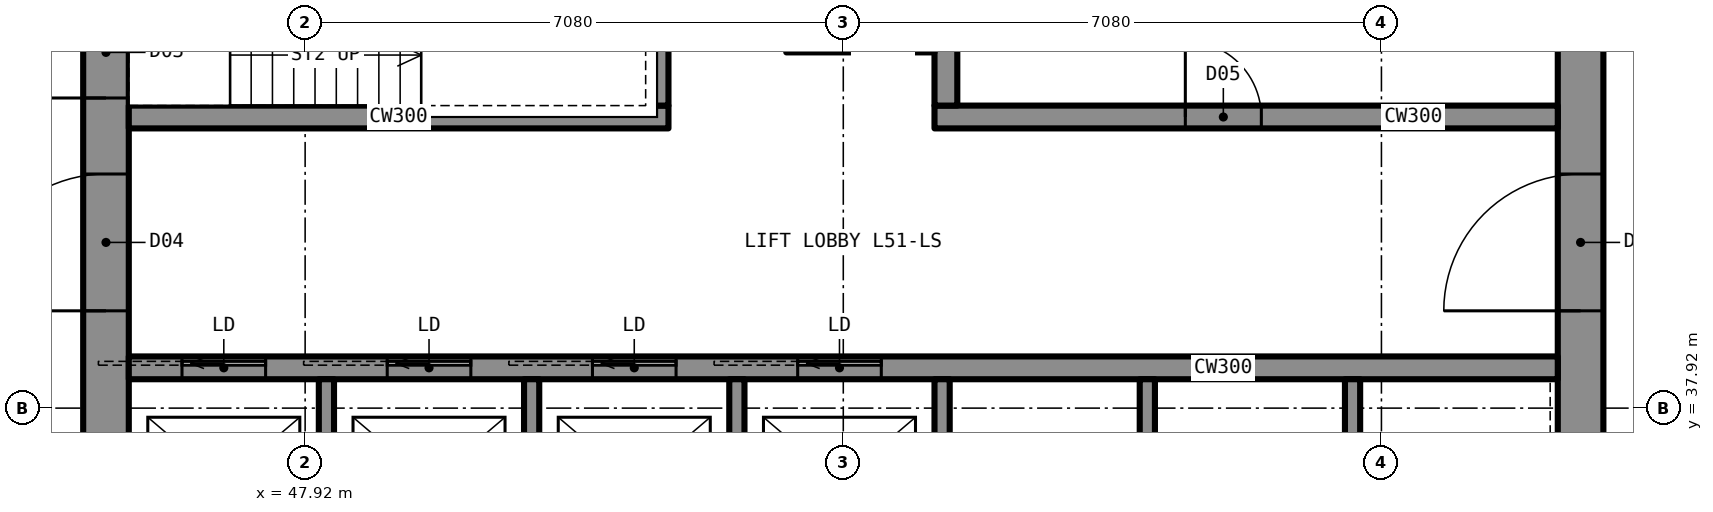
"""IFC4 building model, lengths in metres.
Left out: names, types, materials, properties, quantities, classifications, styles, units other than length and angle.
Written with IfcOpenShell. Run it as: python <this file> out.ifc"""

import sys

from ifc_helpers import new_model, si_unit, direction, frame, frame_2d, origin, place, context, subcontext, project, spatial, rectangle, extrude, element, fill, save


model = new_model("IFC4")
c1 = context("Model", 3, precision=1e-05, world=origin(), true_north=direction((0.0, 1.0)))
c2 = subcontext(c1, "Body", "Model", "MODEL_VIEW")
j1 = project(units=[si_unit("LENGTHUNIT", "METRE"), si_unit("PLANEANGLEUNIT", "RADIAN")], contexts=[c1])
p1 = place(None, origin())
s1 = spatial("IfcSite", under=j1, at=p1, CompositionType="ELEMENT")
p2 = place(p1, origin())
s2 = spatial("IfcBuilding", under=s1, at=p2, CompositionType="ELEMENT")
p3 = place(p2, frame((0.0, 0.0, 182.8)))
s3 = spatial("IfcBuildingStorey", under=s2, at=p3, CompositionType="ELEMENT", Elevation=182.8)
p4 = place(p3, frame((64.7, 35.6, 0.0), z_axis=(0.0, 0.0, 1.0), x_axis=(0.0, 1.0, 0.0)))
e1 = element("IfcWall", 1, at=p4, inside=s3, PredefinedType="SHEAR", context=c2, shape_type="SweptSolid", body=[
    extrude(rectangle(XDim=18.8, YDim=0.6, at=frame_2d((9.4, 0.0))), origin(), (0.0, 0.0, 1.0), 3.5),
])
p5 = place(p4, frame((13.4, 0.0, 0.0)))
e2 = element("IfcOpeningElement", 2, at=p5, cuts=e1, PredefinedType="OPENING", context=c2, shape_type="SweptSolid", body=[
    extrude(rectangle(XDim=1.8, YDim=2.2, at=frame_2d((0.9, 1.1))), frame((0.0, 0.31, 0.0), z_axis=(0.0, -1.0, 0.0), x_axis=(1.0, 0.0, 0.0)), (0.0, 0.0, 1.0), 0.62),
])
p6 = place(p4, frame((3.6, 0.0, 0.0)))
e3 = element("IfcOpeningElement", 3, at=p6, cuts=e1, PredefinedType="OPENING", context=c2, shape_type="SweptSolid", body=[
    extrude(rectangle(XDim=1.8, YDim=2.2, at=frame_2d((0.9, 1.1))), frame((0.0, 0.31, 0.0), z_axis=(0.0, -1.0, 0.0), x_axis=(1.0, 0.0, 0.0)), (0.0, 0.0, 1.0), 0.62),
])
p7 = place(p3, frame((45.3, 35.6, 0.0), z_axis=(0.0, 0.0, 1.0), x_axis=(0.0, 1.0, 0.0)))
e4 = element("IfcWall", 4, at=p7, inside=s3, PredefinedType="SHEAR", context=c2, shape_type="SweptSolid", body=[
    extrude(rectangle(XDim=18.8, YDim=0.6, at=frame_2d((9.4, 0.0))), origin(), (0.0, 0.0, 1.0), 3.5),
])
p8 = place(p7, frame((13.4, 0.0, 0.0)))
e5 = element("IfcOpeningElement", 5, at=p8, cuts=e4, PredefinedType="OPENING", context=c2, shape_type="SweptSolid", body=[
    extrude(rectangle(XDim=1.8, YDim=2.2, at=frame_2d((0.9, 1.1))), frame((0.0, 0.31, 0.0), z_axis=(0.0, -1.0, 0.0), x_axis=(1.0, 0.0, 0.0)), (0.0, 0.0, 1.0), 0.62),
])
p9 = place(p7, frame((3.6, 0.0, 0.0)))
e6 = element("IfcOpeningElement", 6, at=p9, cuts=e4, PredefinedType="OPENING", context=c2, shape_type="SweptSolid", body=[
    extrude(rectangle(XDim=1.8, YDim=2.2, at=frame_2d((0.9, 1.1))), frame((0.0, 0.31, 0.0), z_axis=(0.0, -1.0, 0.0), x_axis=(1.0, 0.0, 0.0)), (0.0, 0.0, 1.0), 0.62),
])
p10 = place(p7, frame((6.4, 0.0, 0.0)))
e7 = element("IfcOpeningElement", 7, at=p10, cuts=e4, PredefinedType="OPENING", context=c2, shape_type="SweptSolid", body=[
    extrude(rectangle(XDim=1.2, YDim=2.2, at=frame_2d((0.6, 1.1))), frame((0.0, 0.31, 0.0), z_axis=(0.0, -1.0, 0.0), x_axis=(1.0, 0.0, 0.0)), (0.0, 0.0, 1.0), 0.62),
])
p11 = place(p3, frame((45.6, 38.45, 0.0), z_axis=(0.0, 0.0, 1.0), x_axis=(1.0, 0.0, 0.0)))
e8 = element("IfcWall", 8, at=p11, inside=s3, PredefinedType="SHEAR", context=c2, shape_type="SweptSolid", body=[
    extrude(rectangle(XDim=18.8, YDim=0.3, at=frame_2d((9.4, 0.0))), origin(), (0.0, 0.0, 1.0), 3.5),
])
p12 = place(p11, frame((0.7, 0.0, 0.0)))
e9 = element("IfcOpeningElement", 9, at=p12, cuts=e8, PredefinedType="OPENING", context=c2, shape_type="SweptSolid", body=[
    extrude(rectangle(XDim=1.1, YDim=2.2, at=frame_2d((0.55, 1.1))), frame((0.0, 0.16, 0.0), z_axis=(0.0, -1.0, 0.0), x_axis=(1.0, 0.0, 0.0)), (0.0, 0.0, 1.0), 0.32),
])
p13 = place(p11, frame((3.4, 0.0, 0.0)))
e10 = element("IfcOpeningElement", 10, at=p13, cuts=e8, PredefinedType="OPENING", context=c2, shape_type="SweptSolid", body=[
    extrude(rectangle(XDim=1.1, YDim=2.2, at=frame_2d((0.55, 1.1))), frame((0.0, 0.16, 0.0), z_axis=(0.0, -1.0, 0.0), x_axis=(1.0, 0.0, 0.0)), (0.0, 0.0, 1.0), 0.32),
])
p14 = place(p11, frame((6.1, 0.0, 0.0)))
e11 = element("IfcOpeningElement", 11, at=p14, cuts=e8, PredefinedType="OPENING", context=c2, shape_type="SweptSolid", body=[
    extrude(rectangle(XDim=1.1, YDim=2.2, at=frame_2d((0.55, 1.1))), frame((0.0, 0.16, 0.0), z_axis=(0.0, -1.0, 0.0), x_axis=(1.0, 0.0, 0.0)), (0.0, 0.0, 1.0), 0.32),
])
p15 = place(p11, frame((8.8, 0.0, 0.0)))
e12 = element("IfcOpeningElement", 12, at=p15, cuts=e8, PredefinedType="OPENING", context=c2, shape_type="SweptSolid", body=[
    extrude(rectangle(XDim=1.1, YDim=2.2, at=frame_2d((0.55, 1.1))), frame((0.0, 0.16, 0.0), z_axis=(0.0, -1.0, 0.0), x_axis=(1.0, 0.0, 0.0)), (0.0, 0.0, 1.0), 0.32),
])
p16 = place(p3, frame((45.6, 41.75, 0.0), z_axis=(0.0, 0.0, 1.0), x_axis=(1.0, 0.0, 0.0)))
e13 = element("IfcWall", 13, at=p16, inside=s3, PredefinedType="SHEAR", context=c2, shape_type="SweptSolid", body=[
    extrude(rectangle(XDim=7.1, YDim=0.3, at=frame_2d((3.55, 0.0))), origin(), (0.0, 0.0, 1.0), 3.5),
])
p17 = place(p3, frame((56.2, 41.75, 0.0), z_axis=(0.0, 0.0, 1.0), x_axis=(1.0, 0.0, 0.0)))
e14 = element("IfcWall", 14, at=p17, inside=s3, PredefinedType="SHEAR", context=c2, shape_type="SweptSolid", body=[
    extrude(rectangle(XDim=8.2, YDim=0.3, at=frame_2d((4.1, 0.0))), origin(), (0.0, 0.0, 1.0), 3.5),
])
p18 = place(p17, frame((3.3, 0.0, 0.0)))
e15 = element("IfcOpeningElement", 15, at=p18, cuts=e14, PredefinedType="OPENING", context=c2, shape_type="SweptSolid", body=[
    extrude(rectangle(XDim=1.0, YDim=2.1, at=frame_2d((0.5, 1.05))), frame((0.0, 0.16, 0.0), z_axis=(0.0, -1.0, 0.0), x_axis=(1.0, 0.0, 0.0)), (0.0, 0.0, 1.0), 0.32),
])
p19 = place(p3, frame((52.55, 41.9, 0.0), z_axis=(0.0, 0.0, 1.0), x_axis=(0.0, 1.0, 0.0)))
e16 = element("IfcWall", 16, at=p19, inside=s3, PredefinedType="SHEAR", context=c2, shape_type="SweptSolid", body=[
    extrude(rectangle(XDim=6.2, YDim=0.3, at=frame_2d((3.1, 0.0))), origin(), (0.0, 0.0, 1.0), 3.5),
])
p20 = place(p19, frame((4.125, 0.0, 0.0)))
e17 = element("IfcOpeningElement", 17, at=p20, cuts=e16, PredefinedType="OPENING", context=c2, shape_type="SweptSolid", body=[
    extrude(rectangle(XDim=1.2, YDim=2.2, at=frame_2d((0.6, 1.1))), frame((0.0, 0.16, 0.0), z_axis=(0.0, -1.0, 0.0), x_axis=(1.0, 0.0, 0.0)), (0.0, 0.0, 1.0), 0.32),
])
p21 = place(p3, frame((56.35, 41.9, 0.0), z_axis=(0.0, 0.0, 1.0), x_axis=(0.0, 1.0, 0.0)))
e18 = element("IfcWall", 18, at=p21, inside=s3, PredefinedType="SHEAR", context=c2, shape_type="SweptSolid", body=[
    extrude(rectangle(XDim=9.5, YDim=0.3, at=frame_2d((4.75, 0.0))), origin(), (0.0, 0.0, 1.0), 3.5),
])
p22 = place(p21, frame((7.1, 0.0, 0.0)))
e19 = element("IfcOpeningElement", 19, at=p22, cuts=e18, PredefinedType="OPENING", context=c2, shape_type="SweptSolid", body=[
    extrude(rectangle(XDim=1.8, YDim=2.2, at=frame_2d((0.9, 1.1))), frame((0.0, 0.16, 0.0), z_axis=(0.0, -1.0, 0.0), x_axis=(1.0, 0.0, 0.0)), (0.0, 0.0, 1.0), 0.32),
])
p23 = place(p3, frame((54.35, 42.0, 0.0), z_axis=(0.0, 0.0, 1.0), x_axis=(0.0, 1.0, 0.0)))
e20 = element("IfcWall", 20, at=p23, inside=s3, PredefinedType="PARTITIONING", context=c2, shape_type="SweptSolid", body=[
    extrude(rectangle(XDim=1.7, YDim=0.2, at=frame_2d((0.85, 0.0))), origin(), (0.0, 0.0, 1.0), 3.33),
])
p24 = place(p23, frame((0.35, 0.0, 0.0)))
e21 = element("IfcOpeningElement", 21, at=p24, cuts=e20, PredefinedType="OPENING", context=c2, shape_type="SweptSolid", body=[
    extrude(rectangle(XDim=1.0, YDim=2.1, at=frame_2d((0.5, 1.05))), frame((0.0, 0.11, 0.0), z_axis=(0.0, -1.0, 0.0), x_axis=(1.0, 0.0, 0.0)), (0.0, 0.0, 1.0), 0.22),
])
p25 = place(p3, frame((54.25, 42.0, 0.0), z_axis=(0.0, 0.0, 1.0), x_axis=(1.0, 0.0, 0.0)))
e22 = element("IfcWall", 22, at=p25, inside=s3, PredefinedType="PARTITIONING", context=c2, shape_type="SweptSolid", body=[
    extrude(rectangle(XDim=1.95, YDim=0.2, at=frame_2d((0.975, 0.0))), origin(), (0.0, 0.0, 1.0), 3.33),
])
for number, where, z_axis, x_axis in (
    (23, (48.2, 35.6, 0.0), (0.0, 0.0, 1.0), (0.0, 1.0, 0.0)),
    (24, (50.9, 35.6, 0.0), (0.0, 0.0, 1.0), (0.0, 1.0, 0.0)),
    (25, (53.6, 35.6, 0.0), (0.0, 0.0, 1.0), (0.0, 1.0, 0.0)),
    (26, (56.3, 35.6, 0.0), (0.0, 0.0, 1.0), (0.0, 1.0, 0.0)),
    (27, (59.0, 35.6, 0.0), (0.0, 0.0, 1.0), (0.0, 1.0, 0.0)),
    (28, (61.7, 35.6, 0.0), (0.0, 0.0, 1.0), (0.0, 1.0, 0.0)),
):
    element("IfcWall", number, at=place(p3, frame(where, z_axis=z_axis, x_axis=x_axis)), inside=s3, PredefinedType="PARTITIONING", context=c2, shape_type="SweptSolid", body=[
        extrude(rectangle(XDim=2.7, YDim=0.2, at=frame_2d((1.35, 0.0))), origin(), (0.0, 0.0, 1.0), 3.33),
    ])
p26 = place(p24, origin())
e29 = element("IfcDoor", 29, at=p26, inside=s3, OperationType="SINGLE_SWING_LEFT", PredefinedType="DOOR", context=c2, shape_type="SweptSolid", body=[
    extrude(rectangle(XDim=1.0, YDim=2.1, at=frame_2d((0.5, 1.05))), frame((0.0, 0.025, 0.0), z_axis=(0.0, -1.0, 0.0), x_axis=(1.0, 0.0, 0.0)), (0.0, 0.0, 1.0), 0.05),
])
fill(e21, e29)
p27 = place(p9, origin())
e30 = element("IfcDoor", 30, at=p27, inside=s3, OperationType="DOUBLE_DOOR_SINGLE_SWING", PredefinedType="DOOR", context=c2, shape_type="SweptSolid", body=[
    extrude(rectangle(XDim=1.8, YDim=2.2, at=frame_2d((0.9, 1.1))), frame((0.0, 0.025, 0.0), z_axis=(0.0, -1.0, 0.0), x_axis=(1.0, 0.0, 0.0)), (0.0, 0.0, 1.0), 0.05),
])
fill(e6, e30)
p28 = place(p6, origin())
e31 = element("IfcDoor", 31, at=p28, inside=s3, OperationType="DOUBLE_DOOR_SINGLE_SWING", PredefinedType="DOOR", context=c2, shape_type="SweptSolid", body=[
    extrude(rectangle(XDim=1.8, YDim=2.2, at=frame_2d((0.9, 1.1))), frame((0.0, 0.025, 0.0), z_axis=(0.0, -1.0, 0.0), x_axis=(1.0, 0.0, 0.0)), (0.0, 0.0, 1.0), 0.05),
])
fill(e3, e31)
p29 = place(p10, origin())
e32 = element("IfcDoor", 32, at=p29, inside=s3, OperationType="SINGLE_SWING_LEFT", PredefinedType="DOOR", context=c2, shape_type="SweptSolid", body=[
    extrude(rectangle(XDim=1.2, YDim=2.2, at=frame_2d((0.6, 1.1))), frame((0.0, 0.025, 0.0), z_axis=(0.0, -1.0, 0.0), x_axis=(1.0, 0.0, 0.0)), (0.0, 0.0, 1.0), 0.05),
])
fill(e7, e32)
p30 = place(p18, origin())
e33 = element("IfcDoor", 33, at=p30, inside=s3, OperationType="SINGLE_SWING_LEFT", PredefinedType="DOOR", context=c2, shape_type="SweptSolid", body=[
    extrude(rectangle(XDim=1.0, YDim=2.1, at=frame_2d((0.5, 1.05))), frame((0.0, 0.025, 0.0), z_axis=(0.0, -1.0, 0.0), x_axis=(1.0, 0.0, 0.0)), (0.0, 0.0, 1.0), 0.05),
])
fill(e15, e33)
p31 = place(p12, origin())
e34 = element("IfcDoor", 34, at=p31, inside=s3, OperationType="SLIDING_TO_LEFT", PredefinedType="DOOR", context=c2, shape_type="SweptSolid", body=[
    extrude(rectangle(XDim=1.1, YDim=2.2, at=frame_2d((0.55, 1.1))), frame((0.0, 0.025, 0.0), z_axis=(0.0, -1.0, 0.0), x_axis=(1.0, 0.0, 0.0)), (0.0, 0.0, 1.0), 0.05),
])
fill(e9, e34)
p32 = place(p13, origin())
e35 = element("IfcDoor", 35, at=p32, inside=s3, OperationType="SLIDING_TO_LEFT", PredefinedType="DOOR", context=c2, shape_type="SweptSolid", body=[
    extrude(rectangle(XDim=1.1, YDim=2.2, at=frame_2d((0.55, 1.1))), frame((0.0, 0.025, 0.0), z_axis=(0.0, -1.0, 0.0), x_axis=(1.0, 0.0, 0.0)), (0.0, 0.0, 1.0), 0.05),
])
fill(e10, e35)
p33 = place(p14, origin())
e36 = element("IfcDoor", 36, at=p33, inside=s3, OperationType="SLIDING_TO_LEFT", PredefinedType="DOOR", context=c2, shape_type="SweptSolid", body=[
    extrude(rectangle(XDim=1.1, YDim=2.2, at=frame_2d((0.55, 1.1))), frame((0.0, 0.025, 0.0), z_axis=(0.0, -1.0, 0.0), x_axis=(1.0, 0.0, 0.0)), (0.0, 0.0, 1.0), 0.05),
])
fill(e11, e36)
p34 = place(p15, origin())
e37 = element("IfcDoor", 37, at=p34, inside=s3, OperationType="SLIDING_TO_LEFT", PredefinedType="DOOR", context=c2, shape_type="SweptSolid", body=[
    extrude(rectangle(XDim=1.1, YDim=2.2, at=frame_2d((0.55, 1.1))), frame((0.0, 0.025, 0.0), z_axis=(0.0, -1.0, 0.0), x_axis=(1.0, 0.0, 0.0)), (0.0, 0.0, 1.0), 0.05),
])
fill(e12, e37)
save(model, sys.argv[1])
